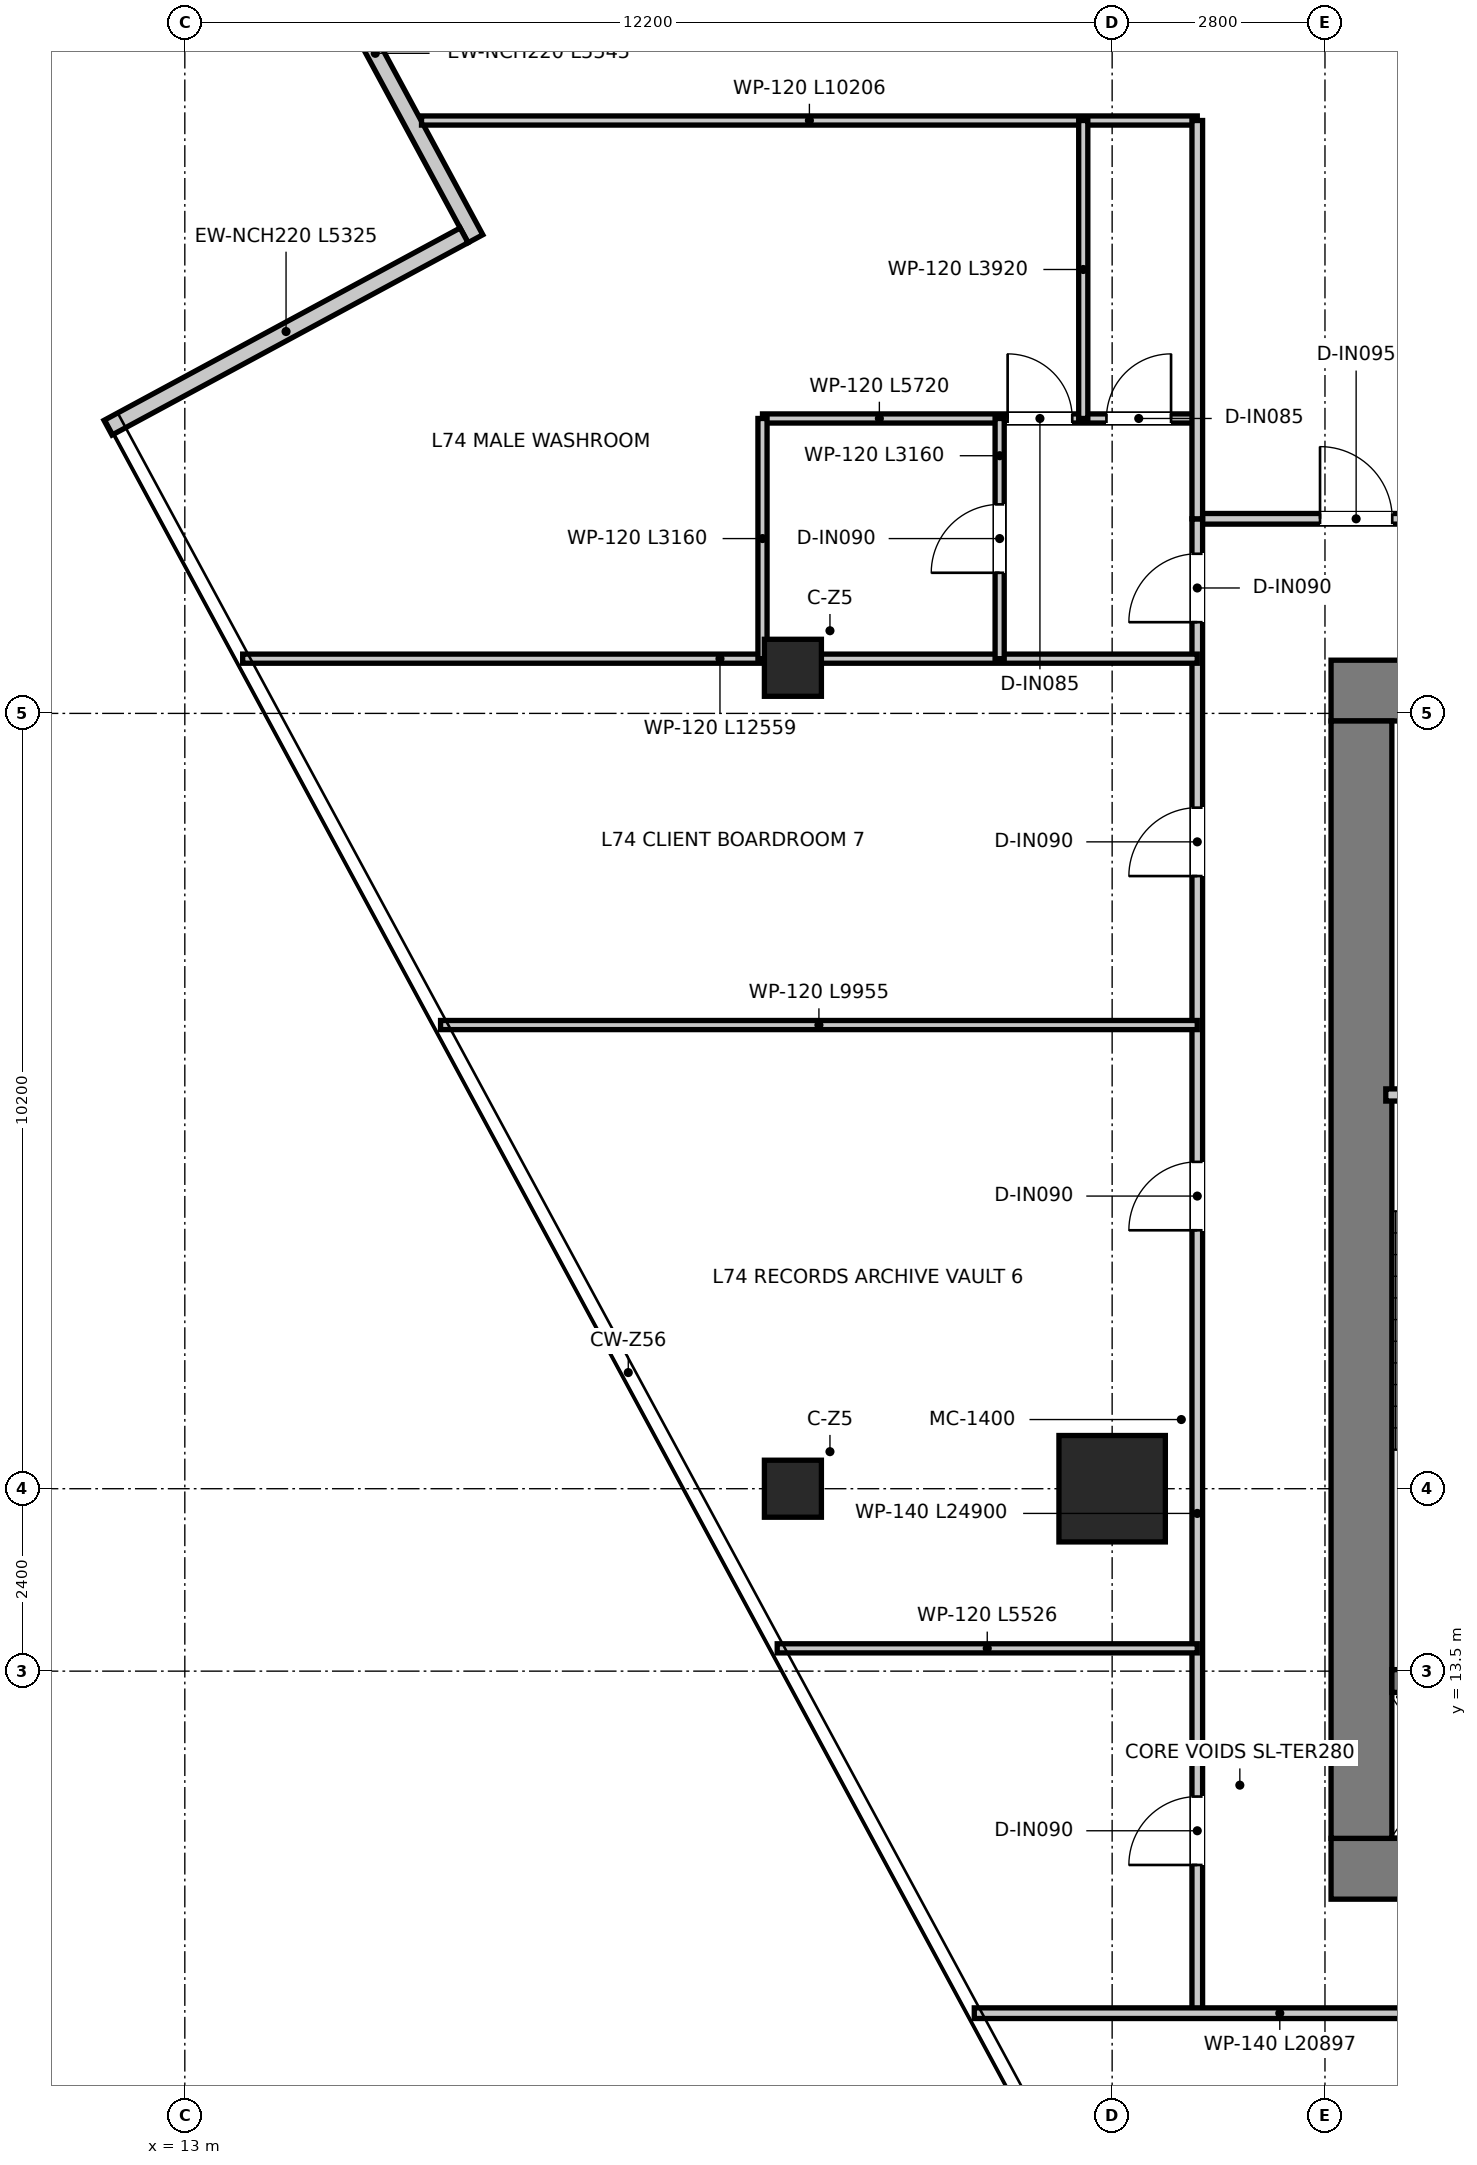
"""IFC4 building model, lengths in metres.
Left out: names, types, materials, properties, quantities, classifications, styles, units other than length and angle.
Written with IfcOpenShell. Run it as: python <this file> out.ifc"""

import sys

from ifc_helpers import new_model, si_unit, direction, frame, frame_2d, origin, origin_2d, place, context, subcontext, project, spatial, rectangle, extrude, source, transform, mapped, element, fill, save


model = new_model("IFC4")
c1 = context("Model", 3, precision=1e-05, world=origin(), true_north=direction((0.0, 1.0)))
c2 = subcontext(c1, "Body", "Model", "MODEL_VIEW")
j1 = project(units=[si_unit("LENGTHUNIT", "METRE"), si_unit("PLANEANGLEUNIT", "RADIAN")], contexts=[c1])
p1 = place(None, origin())
s1 = spatial("IfcSite", under=j1, at=p1, CompositionType="ELEMENT")
p2 = place(p1, origin())
s2 = spatial("IfcBuilding", under=s1, at=p2, CompositionType="ELEMENT")
p3 = place(p2, frame((0.0, 0.0, 302.95)))
s3 = spatial("IfcBuildingStorey", under=s2, at=p3, CompositionType="ELEMENT", Elevation=302.95)
p4 = place(p3, frame((28.08, 10.9, 0.0), z_axis=(0.0, 0.0, 1.0), x_axis=(1.0, 0.0, 0.0)))
e1 = element("IfcWall", 1, at=p4, inside=s3, PredefinedType="SHEAR", context=c2, shape_type="SweptSolid", body=[
    extrude(rectangle(XDim=15.84, YDim=0.8, at=frame_2d((7.92, 0.0))), origin(), (0.0, 0.0, 1.0), 3.95),
])
p5 = place(p3, frame((28.08, 26.4, 0.0), z_axis=(0.0, 0.0, 1.0), x_axis=(1.0, 0.0, 0.0)))
e2 = element("IfcWall", 2, at=p5, inside=s3, PredefinedType="SHEAR", context=c2, shape_type="SweptSolid", body=[
    extrude(rectangle(XDim=15.84, YDim=0.8, at=frame_2d((7.92, 0.0))), origin(), (0.0, 0.0, 1.0), 3.95),
])
p6 = place(p5, frame((7.22, 0.0, 0.0)))
e3 = element("IfcOpeningElement", 3, at=p6, cuts=e2, PredefinedType="OPENING", context=c2, shape_type="SweptSolid", body=[
    extrude(rectangle(XDim=1.4, YDim=2.2, at=frame_2d((0.7, 1.1))), frame((0.0, 0.41, 0.0), z_axis=(0.0, -1.0, 0.0), x_axis=(1.0, 0.0, 0.0)), (0.0, 0.0, 1.0), 0.82),
])
p7 = place(p5, frame((1.775, 0.0, 0.0)))
e4 = element("IfcOpeningElement", 4, at=p7, cuts=e2, PredefinedType="OPENING", context=c2, shape_type="SweptSolid", body=[
    extrude(rectangle(XDim=1.05, YDim=2.1, at=frame_2d((0.525, 1.05))), frame((0.0, 0.41, 0.0), z_axis=(0.0, -1.0, 0.0), x_axis=(1.0, 0.0, 0.0)), (0.0, 0.0, 1.0), 0.82),
])
p8 = place(p5, frame((13.015, 0.0, 0.0)))
e5 = element("IfcOpeningElement", 5, at=p8, cuts=e2, PredefinedType="OPENING", context=c2, shape_type="SweptSolid", body=[
    extrude(rectangle(XDim=1.05, YDim=2.1, at=frame_2d((0.525, 1.05))), frame((0.0, 0.41, 0.0), z_axis=(0.0, -1.0, 0.0), x_axis=(1.0, 0.0, 0.0)), (0.0, 0.0, 1.0), 0.82),
])
p9 = place(p3, frame((28.48, 11.3, 0.0), z_axis=(0.0, 0.0, 1.0), x_axis=(0.0, 1.0, 0.0)))
e6 = element("IfcWall", 6, at=p9, inside=s3, PredefinedType="SHEAR", context=c2, shape_type="SweptSolid", body=[
    extrude(rectangle(XDim=14.7, YDim=0.8, at=frame_2d((7.35, 0.0))), origin(), (0.0, 0.0, 1.0), 3.95),
])
p10 = place(p3, frame((28.88, 13.37, 0.0), z_axis=(0.0, 0.0, 1.0), x_axis=(1.0, 0.0, 0.0)))
e7 = element("IfcWall", 7, at=p10, inside=s3, PredefinedType="SHEAR", context=c2, shape_type="SweptSolid", body=[
    extrude(rectangle(XDim=3.1, YDim=0.3, at=frame_2d((1.55, 0.0))), origin(), (0.0, 0.0, 1.0), 3.95),
])
m1 = source(origin(), c2, "Body", "SweptSolid", [
    extrude(rectangle(XDim=1.4, YDim=1.4, at=origin_2d()), origin(), (0.0, 0.0, 1.0), 3.95),
])
p11 = place(p3, frame((25.2, 15.9, 0.0), z_axis=(0.0, 0.0, 1.0), x_axis=(1.0, 0.0, 0.0)))
e8 = element("IfcColumn", 8, at=p11, inside=s3, PredefinedType="USERDEFINED", context=c2, shape_type="MappedRepresentation", body=[
    mapped(m1, transform((0.0, 0.0, 0.0), x_axis=(1.0, 0.0, 0.0), y_axis=(0.0, 1.0, 0.0), z_axis=(0.0, 0.0, 1.0), scale=1.0)),
])
m2 = source(origin(), c2, "Body", "SweptSolid", [
    extrude(rectangle(XDim=0.75, YDim=0.75, at=origin_2d()), origin(), (0.0, 0.0, 1.0), 3.95),
])
for number, where, z_axis, x_axis in (
    (9, (21.0, 15.9, 0.0), (0.0, 0.0, 1.0), (1.0, 0.0, 0.0)),
    (10, (21.0, 26.7, 0.0), (0.0, 0.0, 1.0), (1.0, 0.0, 0.0)),
):
    element("IfcColumn", number, at=place(p3, frame(where, z_axis=z_axis, x_axis=x_axis)), inside=s3, PredefinedType="COLUMN", context=c2, shape_type="MappedRepresentation", body=[
        mapped(m2, transform((0.0, 0.0, 0.0), x_axis=(1.0, 0.0, 0.0), y_axis=(0.0, 1.0, 0.0), z_axis=(0.0, 0.0, 1.0), scale=1.0)),
    ])
p12 = place(p3, frame((14.188, 37.223, 0.0), z_axis=(0.0, 0.0, 1.0), x_axis=(0.475257315172, -0.879846852796, 0.0)))
e11 = element("IfcWall", 11, at=p12, inside=s3, PredefinedType="ELEMENTEDWALL", context=c2, shape_type="SweptSolid", body=[
    extrude(rectangle(XDim=5.545, YDim=0.22, at=frame_2d((2.772, 0.0))), origin(), (0.0, 0.0, 1.0), 3.67),
])
p13 = place(p3, frame((16.674, 32.389, 0.0), z_axis=(0.0, 0.0, 1.0), x_axis=(-0.879859387449, -0.475234108958, 0.0)))
e12 = element("IfcWall", 12, at=p13, inside=s3, PredefinedType="ELEMENTEDWALL", context=c2, shape_type="SweptSolid", body=[
    extrude(rectangle(XDim=5.325, YDim=0.22, at=frame_2d((2.662, 0.0))), origin(), (0.0, 0.0, 1.0), 3.67),
])
p14 = place(p3, frame((28.8, 21.08, 0.0), z_axis=(0.0, 0.0, 1.0), x_axis=(1.0, 0.0, 0.0)))
e13 = element("IfcWall", 13, at=p14, inside=s3, PredefinedType="PARTITIONING", context=c2, shape_type="SweptSolid", body=[
    extrude(rectangle(XDim=3.16, YDim=0.16, at=frame_2d((1.58, 0.0))), origin(), (0.0, 0.0, 1.0), 3.67),
])
p15 = place(p14, frame((1.055, 0.0, 0.0)))
e14 = element("IfcOpeningElement", 14, at=p15, cuts=e13, PredefinedType="OPENING", context=c2, shape_type="SweptSolid", body=[
    extrude(rectangle(XDim=1.05, YDim=2.1, at=frame_2d((0.525, 1.05))), frame((0.0, 0.09, 0.0), z_axis=(0.0, -1.0, 0.0), x_axis=(1.0, 0.0, 0.0)), (0.0, 0.0, 1.0), 0.18),
])
p16 = place(p3, frame((26.32, 28.66, 0.0), z_axis=(0.0, 0.0, 1.0), x_axis=(1.0, 0.0, 0.0)))
e15 = element("IfcWall", 15, at=p16, inside=s3, PredefinedType="PARTITIONING", context=c2, shape_type="SweptSolid", body=[
    extrude(rectangle(XDim=19.36, YDim=0.14, at=frame_2d((9.68, 0.0))), origin(), (0.0, 0.0, 1.0), 3.18),
])
p17 = place(p16, frame((1.615, 0.0, 0.0)))
e16 = element("IfcOpeningElement", 16, at=p17, cuts=e15, PredefinedType="OPENING", context=c2, shape_type="SweptSolid", body=[
    extrude(rectangle(XDim=0.95, YDim=2.1, at=frame_2d((0.475, 1.05))), frame((0.0, 0.08, 0.0), z_axis=(0.0, -1.0, 0.0), x_axis=(1.0, 0.0, 0.0)), (0.0, 0.0, 1.0), 0.16),
])
p18 = place(p16, frame((6.455, 0.0, 0.0)))
e17 = element("IfcOpeningElement", 17, at=p18, cuts=e15, PredefinedType="OPENING", context=c2, shape_type="SweptSolid", body=[
    extrude(rectangle(XDim=0.95, YDim=2.1, at=frame_2d((0.475, 1.05))), frame((0.0, 0.08, 0.0), z_axis=(0.0, -1.0, 0.0), x_axis=(1.0, 0.0, 0.0)), (0.0, 0.0, 1.0), 0.16),
])
p19 = place(p16, frame((11.955, 0.0, 0.0)))
e18 = element("IfcOpeningElement", 18, at=p19, cuts=e15, PredefinedType="OPENING", context=c2, shape_type="SweptSolid", body=[
    extrude(rectangle(XDim=0.95, YDim=2.1, at=frame_2d((0.475, 1.05))), frame((0.0, 0.08, 0.0), z_axis=(0.0, -1.0, 0.0), x_axis=(1.0, 0.0, 0.0)), (0.0, 0.0, 1.0), 0.16),
])
p20 = place(p16, frame((16.795, 0.0, 0.0)))
e19 = element("IfcOpeningElement", 19, at=p20, cuts=e15, PredefinedType="OPENING", context=c2, shape_type="SweptSolid", body=[
    extrude(rectangle(XDim=0.95, YDim=2.1, at=frame_2d((0.475, 1.05))), frame((0.0, 0.08, 0.0), z_axis=(0.0, -1.0, 0.0), x_axis=(1.0, 0.0, 0.0)), (0.0, 0.0, 1.0), 0.16),
])
p21 = place(p3, frame((26.32, 9.0, 0.0), z_axis=(0.0, 0.0, 1.0), x_axis=(0.0, 1.0, 0.0)))
e20 = element("IfcWall", 20, at=p21, inside=s3, PredefinedType="PARTITIONING", context=c2, shape_type="SweptSolid", body=[
    extrude(rectangle(XDim=19.66, YDim=0.14, at=frame_2d((9.83, 0.0))), origin(), (0.0, 0.0, 1.0), 3.13),
])
p22 = place(p21, frame((18.3, 0.0, 0.0)))
e21 = element("IfcOpeningElement", 21, at=p22, cuts=e20, PredefinedType="OPENING", context=c2, shape_type="SweptSolid", body=[
    extrude(rectangle(XDim=0.9, YDim=2.1, at=frame_2d((0.45, 1.05))), frame((0.0, 0.08, 0.0), z_axis=(0.0, -1.0, 0.0), x_axis=(1.0, 0.0, 0.0)), (0.0, 0.0, 1.0), 0.16),
])
p23 = place(p21, frame((1.95, 0.0, 0.0)))
e22 = element("IfcOpeningElement", 22, at=p23, cuts=e20, PredefinedType="OPENING", context=c2, shape_type="SweptSolid", body=[
    extrude(rectangle(XDim=0.9, YDim=2.1, at=frame_2d((0.45, 1.05))), frame((0.0, 0.08, 0.0), z_axis=(0.0, -1.0, 0.0), x_axis=(1.0, 0.0, 0.0)), (0.0, 0.0, 1.0), 0.16),
])
p24 = place(p21, frame((10.3, 0.0, 0.0)))
e23 = element("IfcOpeningElement", 23, at=p24, cuts=e20, PredefinedType="OPENING", context=c2, shape_type="SweptSolid", body=[
    extrude(rectangle(XDim=0.9, YDim=2.1, at=frame_2d((0.45, 1.05))), frame((0.0, 0.08, 0.0), z_axis=(0.0, -1.0, 0.0), x_axis=(1.0, 0.0, 0.0)), (0.0, 0.0, 1.0), 0.16),
])
p25 = place(p21, frame((14.96, 0.0, 0.0)))
e24 = element("IfcOpeningElement", 24, at=p25, cuts=e20, PredefinedType="OPENING", context=c2, shape_type="SweptSolid", body=[
    extrude(rectangle(XDim=0.9, YDim=2.1, at=frame_2d((0.45, 1.05))), frame((0.0, 0.08, 0.0), z_axis=(0.0, -1.0, 0.0), x_axis=(1.0, 0.0, 0.0)), (0.0, 0.0, 1.0), 0.16),
])
p26 = place(p3, frame((23.386, 9.0, 0.0), z_axis=(0.0, 0.0, 1.0), x_axis=(1.0, 0.0, 0.0)))
e25 = element("IfcWall", 25, at=p26, inside=s3, PredefinedType="PARTITIONING", context=c2, shape_type="SweptSolid", body=[
    extrude(rectangle(XDim=20.897, YDim=0.14, at=frame_2d((10.448, 0.0))), origin(), (0.0, 0.0, 1.0), 3.67),
])
p27 = place(p26, frame((8.189, 0.0, 0.0)))
e26 = element("IfcOpeningElement", 26, at=p27, cuts=e25, PredefinedType="OPENING", context=c2, shape_type="SweptSolid", body=[
    extrude(rectangle(XDim=0.85, YDim=2.1, at=frame_2d((0.425, 1.05))), frame((0.0, 0.08, 0.0), z_axis=(0.0, -1.0, 0.0), x_axis=(1.0, 0.0, 0.0)), (0.0, 0.0, 1.0), 0.16),
])
p28 = place(p26, frame((16.189, 0.0, 0.0)))
e27 = element("IfcOpeningElement", 27, at=p28, cuts=e25, PredefinedType="OPENING", context=c2, shape_type="SweptSolid", body=[
    extrude(rectangle(XDim=0.85, YDim=2.1, at=frame_2d((0.425, 1.05))), frame((0.0, 0.08, 0.0), z_axis=(0.0, -1.0, 0.0), x_axis=(1.0, 0.0, 0.0)), (0.0, 0.0, 1.0), 0.16),
])
p29 = place(p3, frame((13.761, 26.82, 0.0), z_axis=(0.0, 0.0, 1.0), x_axis=(1.0, 0.0, 0.0)))
e28 = element("IfcWall", 28, at=p29, inside=s3, PredefinedType="PARTITIONING", context=c2, shape_type="SweptSolid", body=[
    extrude(rectangle(XDim=12.559, YDim=0.12, at=frame_2d((6.28, 0.0))), origin(), (0.0, 0.0, 1.0), 3.13),
])
p30 = place(p3, frame((16.114, 33.9, 0.0), z_axis=(0.0, 0.0, 1.0), x_axis=(1.0, 0.0, 0.0)))
e29 = element("IfcWall", 29, at=p30, inside=s3, PredefinedType="PARTITIONING", context=c2, shape_type="SweptSolid", body=[
    extrude(rectangle(XDim=10.206, YDim=0.12, at=frame_2d((5.103, 0.0))), origin(), (0.0, 0.0, 1.0), 3.13),
])
p31 = place(p3, frame((20.6, 29.98, 0.0), z_axis=(0.0, 0.0, 1.0), x_axis=(1.0, 0.0, 0.0)))
e30 = element("IfcWall", 30, at=p31, inside=s3, PredefinedType="PARTITIONING", context=c2, shape_type="SweptSolid", body=[
    extrude(rectangle(XDim=5.72, YDim=0.12, at=frame_2d((2.86, 0.0))), origin(), (0.0, 0.0, 1.0), 3.13),
])
p32 = place(p31, frame((3.225, 0.0, 0.0)))
e31 = element("IfcOpeningElement", 31, at=p32, cuts=e30, PredefinedType="OPENING", context=c2, shape_type="SweptSolid", body=[
    extrude(rectangle(XDim=0.85, YDim=2.1, at=frame_2d((0.425, 1.05))), frame((0.0, 0.07, 0.0), z_axis=(0.0, -1.0, 0.0), x_axis=(1.0, 0.0, 0.0)), (0.0, 0.0, 1.0), 0.14),
])
p33 = place(p31, frame((4.525, 0.0, 0.0)))
e32 = element("IfcOpeningElement", 32, at=p33, cuts=e30, PredefinedType="OPENING", context=c2, shape_type="SweptSolid", body=[
    extrude(rectangle(XDim=0.85, YDim=2.1, at=frame_2d((0.425, 1.05))), frame((0.0, 0.07, 0.0), z_axis=(0.0, -1.0, 0.0), x_axis=(1.0, 0.0, 0.0)), (0.0, 0.0, 1.0), 0.14),
])
p34 = place(p3, frame((20.6, 26.82, 0.0), z_axis=(0.0, 0.0, 1.0), x_axis=(0.0, 1.0, 0.0)))
e33 = element("IfcWall", 33, at=p34, inside=s3, PredefinedType="PARTITIONING", context=c2, shape_type="SweptSolid", body=[
    extrude(rectangle(XDim=3.16, YDim=0.12, at=frame_2d((1.58, 0.0))), origin(), (0.0, 0.0, 1.0), 3.67),
])
p35 = place(p3, frame((23.72, 26.82, 0.0), z_axis=(0.0, 0.0, 1.0), x_axis=(0.0, 1.0, 0.0)))
e34 = element("IfcWall", 34, at=p35, inside=s3, PredefinedType="PARTITIONING", context=c2, shape_type="SweptSolid", body=[
    extrude(rectangle(XDim=3.16, YDim=0.12, at=frame_2d((1.58, 0.0))), origin(), (0.0, 0.0, 1.0), 3.18),
])
p36 = place(p35, frame((1.13, 0.0, 0.0)))
e35 = element("IfcOpeningElement", 35, at=p36, cuts=e34, PredefinedType="OPENING", context=c2, shape_type="SweptSolid", body=[
    extrude(rectangle(XDim=0.9, YDim=2.1, at=frame_2d((0.45, 1.05))), frame((0.0, 0.07, 0.0), z_axis=(0.0, -1.0, 0.0), x_axis=(1.0, 0.0, 0.0)), (0.0, 0.0, 1.0), 0.14),
])
p37 = place(p3, frame((24.82, 29.98, 0.0), z_axis=(0.0, 0.0, 1.0), x_axis=(0.0, 1.0, 0.0)))
e36 = element("IfcWall", 36, at=p37, inside=s3, PredefinedType="PARTITIONING", context=c2, shape_type="SweptSolid", body=[
    extrude(rectangle(XDim=3.92, YDim=0.12, at=frame_2d((1.96, 0.0))), origin(), (0.0, 0.0, 1.0), 3.31),
])
p38 = place(p3, frame((26.32, 28.66, 0.0), z_axis=(0.0, 0.0, 1.0), x_axis=(0.0, 1.0, 0.0)))
e37 = element("IfcWall", 37, at=p38, inside=s3, PredefinedType="PARTITIONING", context=c2, shape_type="SweptSolid", body=[
    extrude(rectangle(XDim=5.24, YDim=0.14, at=frame_2d((2.62, 0.0))), origin(), (0.0, 0.0, 1.0), 3.43),
])
p39 = place(p3, frame((20.794, 13.8, 0.0), z_axis=(0.0, 0.0, 1.0), x_axis=(1.0, 0.0, 0.0)))
e38 = element("IfcWall", 38, at=p39, inside=s3, PredefinedType="PARTITIONING", context=c2, shape_type="SweptSolid", body=[
    extrude(rectangle(XDim=5.526, YDim=0.12, at=frame_2d((2.763, 0.0))), origin(), (0.0, 0.0, 1.0), 3.18),
])
p40 = place(p3, frame((16.365, 22.0, 0.0), z_axis=(0.0, 0.0, 1.0), x_axis=(1.0, 0.0, 0.0)))
e39 = element("IfcWall", 39, at=p40, inside=s3, PredefinedType="PARTITIONING", context=c2, shape_type="SweptSolid", body=[
    extrude(rectangle(XDim=9.956, YDim=0.12, at=frame_2d((4.978, 0.0))), origin(), (0.0, 0.0, 1.0), 3.13),
])
p41 = place(p22, origin())
e40 = element("IfcDoor", 40, at=p41, inside=s3, OperationType="SINGLE_SWING_LEFT", PredefinedType="DOOR", context=c2, shape_type="SweptSolid", body=[
    extrude(rectangle(XDim=0.9, YDim=2.1, at=frame_2d((0.45, 1.05))), frame((0.0, 0.025, 0.0), z_axis=(0.0, -1.0, 0.0), x_axis=(1.0, 0.0, 0.0)), (0.0, 0.0, 1.0), 0.05),
])
fill(e21, e40)
p42 = place(p32, origin())
e41 = element("IfcDoor", 41, at=p42, inside=s3, OperationType="SINGLE_SWING_LEFT", PredefinedType="DOOR", context=c2, shape_type="SweptSolid", body=[
    extrude(rectangle(XDim=0.85, YDim=2.1, at=frame_2d((0.425, 1.05))), frame((0.0, 0.025, 0.0), z_axis=(0.0, -1.0, 0.0), x_axis=(1.0, 0.0, 0.0)), (0.0, 0.0, 1.0), 0.05),
])
fill(e31, e41)
p43 = place(p33, origin())
e42 = element("IfcDoor", 42, at=p43, inside=s3, OperationType="SINGLE_SWING_RIGHT", PredefinedType="DOOR", context=c2, shape_type="SweptSolid", body=[
    extrude(rectangle(XDim=0.85, YDim=2.1, at=frame_2d((0.425, 1.05))), frame((0.0, 0.025, 0.0), z_axis=(0.0, -1.0, 0.0), x_axis=(1.0, 0.0, 0.0)), (0.0, 0.0, 1.0), 0.05),
])
fill(e32, e42)
p44 = place(p36, origin())
e43 = element("IfcDoor", 43, at=p44, inside=s3, OperationType="SINGLE_SWING_LEFT", PredefinedType="DOOR", context=c2, shape_type="SweptSolid", body=[
    extrude(rectangle(XDim=0.9, YDim=2.1, at=frame_2d((0.45, 1.05))), frame((0.0, 0.025, 0.0), z_axis=(0.0, -1.0, 0.0), x_axis=(1.0, 0.0, 0.0)), (0.0, 0.0, 1.0), 0.05),
])
fill(e35, e43)
p45 = place(p17, origin())
e44 = element("IfcDoor", 44, at=p45, inside=s3, OperationType="SINGLE_SWING_LEFT", PredefinedType="DOOR", context=c2, shape_type="SweptSolid", body=[
    extrude(rectangle(XDim=0.95, YDim=2.1, at=frame_2d((0.475, 1.05))), frame((0.0, 0.025, 0.0), z_axis=(0.0, -1.0, 0.0), x_axis=(1.0, 0.0, 0.0)), (0.0, 0.0, 1.0), 0.05),
])
fill(e16, e44)
p46 = place(p23, origin())
e45 = element("IfcDoor", 45, at=p46, inside=s3, OperationType="SINGLE_SWING_LEFT", PredefinedType="DOOR", context=c2, shape_type="SweptSolid", body=[
    extrude(rectangle(XDim=0.9, YDim=2.1, at=frame_2d((0.45, 1.05))), frame((0.0, 0.025, 0.0), z_axis=(0.0, -1.0, 0.0), x_axis=(1.0, 0.0, 0.0)), (0.0, 0.0, 1.0), 0.05),
])
fill(e22, e45)
p47 = place(p24, origin())
e46 = element("IfcDoor", 46, at=p47, inside=s3, OperationType="SINGLE_SWING_LEFT", PredefinedType="DOOR", context=c2, shape_type="SweptSolid", body=[
    extrude(rectangle(XDim=0.9, YDim=2.1, at=frame_2d((0.45, 1.05))), frame((0.0, 0.025, 0.0), z_axis=(0.0, -1.0, 0.0), x_axis=(1.0, 0.0, 0.0)), (0.0, 0.0, 1.0), 0.05),
])
fill(e23, e46)
p48 = place(p25, origin())
e47 = element("IfcDoor", 47, at=p48, inside=s3, OperationType="SINGLE_SWING_LEFT", PredefinedType="DOOR", context=c2, shape_type="SweptSolid", body=[
    extrude(rectangle(XDim=0.9, YDim=2.1, at=frame_2d((0.45, 1.05))), frame((0.0, 0.025, 0.0), z_axis=(0.0, -1.0, 0.0), x_axis=(1.0, 0.0, 0.0)), (0.0, 0.0, 1.0), 0.05),
])
fill(e24, e47)
save(model, sys.argv[1])
